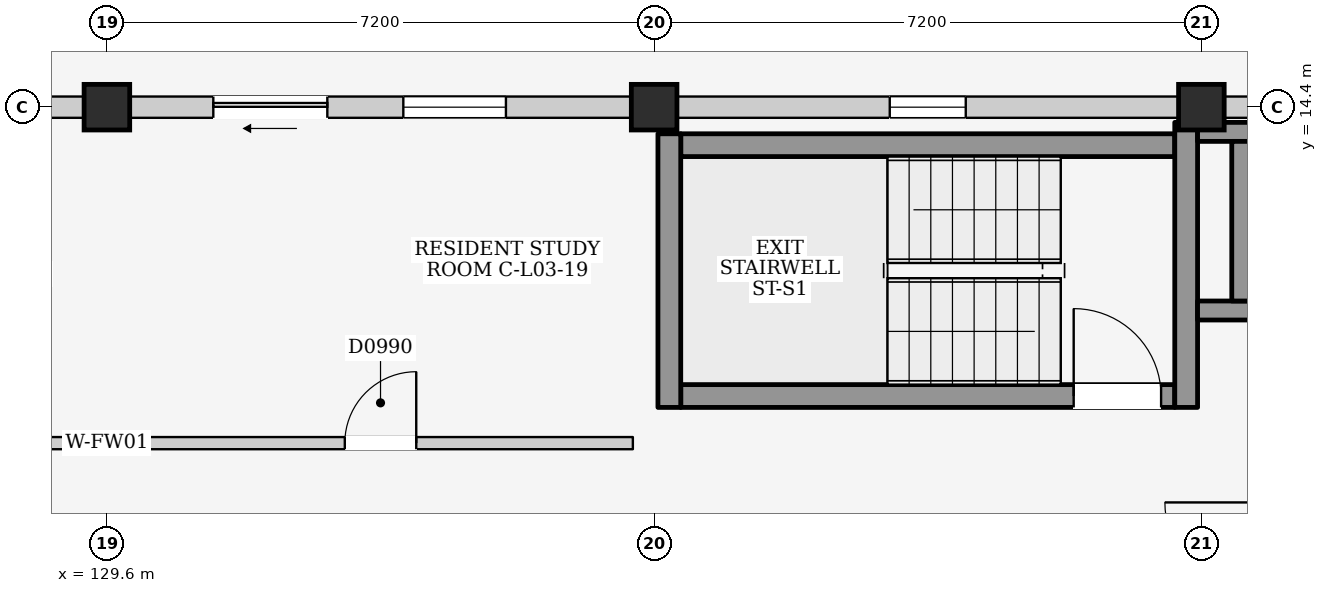
"""IFC4 building model, lengths in metres.
Left out: names, types, materials, properties, quantities, classifications, styles, units other than length and angle.
Written with IfcOpenShell. Run it as: python <this file> out.ifc"""

import sys

from ifc_helpers import new_model, si_unit, direction, frame, frame_2d, origin, origin_2d, place, context, subcontext, project, spatial, rectangle, extrude, element, fill, save


model = new_model("IFC4")
c1 = context("Model", 3, precision=1e-05, world=origin(), true_north=direction((0.0, 1.0)))
c2 = subcontext(c1, "Body", "Model", "MODEL_VIEW")
j1 = project(units=[si_unit("LENGTHUNIT", "METRE"), si_unit("PLANEANGLEUNIT", "RADIAN")], contexts=[c1])
p1 = place(None, origin())
s1 = spatial("IfcSite", under=j1, at=p1, CompositionType="ELEMENT")
p2 = place(p1, origin())
s2 = spatial("IfcBuilding", under=s1, at=p2, CompositionType="ELEMENT")
p3 = place(p2, frame((0.0, 0.0, 12.2)))
s3 = spatial("IfcBuildingStorey", under=s2, at=p3, CompositionType="ELEMENT", Elevation=12.2)
for number, where, z_axis, x_axis in (
    (1, (129.6, 14.4, 0.0), (0.0, 0.0, 1.0), (1.0, 0.0, 0.0)),
    (2, (136.8, 14.4, 0.0), (0.0, 0.0, 1.0), (1.0, 0.0, 0.0)),
    (3, (144.0, 14.4, 0.0), (0.0, 0.0, 1.0), (1.0, 0.0, 0.0)),
):
    element("IfcColumn", number, at=place(p3, frame(where, z_axis=z_axis, x_axis=x_axis)), inside=s3, PredefinedType="COLUMN", context=c2, shape_type="SweptSolid", body=[
        extrude(rectangle(XDim=0.6, YDim=0.6, at=origin_2d()), origin(), (0.0, 0.0, 1.0), 3.2),
    ])
p4 = place(p3, frame((122.7, 14.4, 0.0), z_axis=(0.0, 0.0, 1.0), x_axis=(1.0, 0.0, 0.0)))
e4 = element("IfcWall", 4, at=p4, inside=s3, PredefinedType="ELEMENTEDWALL", context=c2, shape_type="SweptSolid", body=[
    extrude(rectangle(XDim=6.6, YDim=0.28, at=frame_2d((3.3, 0.0))), origin(), (0.0, 0.0, 1.0), 2.365),
])
p5 = place(p4, frame((1.1, 0.0, 0.0)))
e5 = element("IfcOpeningElement", 5, at=p5, cuts=e4, PredefinedType="OPENING", context=c2, shape_type="SweptSolid", body=[
    extrude(rectangle(XDim=1.5, YDim=2.12, at=frame_2d((0.75, 1.06))), frame((0.0, 0.155, 0.0), z_axis=(0.0, -1.0, 0.0), x_axis=(1.0, 0.0, 0.0)), (0.0, 0.0, 1.0), 0.31),
])
p6 = place(p4, frame((3.6, 0.0, 0.755)))
e6 = element("IfcOpeningElement", 6, at=p6, cuts=e4, PredefinedType="OPENING", context=c2, shape_type="SweptSolid", body=[
    extrude(rectangle(XDim=1.35, YDim=1.5, at=frame_2d((0.675, 0.75))), frame((0.0, 0.155, 0.0), z_axis=(0.0, -1.0, 0.0), x_axis=(1.0, 0.0, 0.0)), (0.0, 0.0, 1.0), 0.31),
])
p7 = place(p3, frame((129.9, 14.4, 0.0), z_axis=(0.0, 0.0, 1.0), x_axis=(1.0, 0.0, 0.0)))
e7 = element("IfcWall", 7, at=p7, inside=s3, PredefinedType="ELEMENTEDWALL", context=c2, shape_type="SweptSolid", body=[
    extrude(rectangle(XDim=6.6, YDim=0.28, at=frame_2d((3.3, 0.0))), origin(), (0.0, 0.0, 1.0), 2.365),
])
p8 = place(p7, frame((1.1, 0.0, 0.0)))
e8 = element("IfcOpeningElement", 8, at=p8, cuts=e7, PredefinedType="OPENING", context=c2, shape_type="SweptSolid", body=[
    extrude(rectangle(XDim=1.5, YDim=2.12, at=frame_2d((0.75, 1.06))), frame((0.0, 0.155, 0.0), z_axis=(0.0, -1.0, 0.0), x_axis=(1.0, 0.0, 0.0)), (0.0, 0.0, 1.0), 0.31),
])
p9 = place(p7, frame((3.6, 0.0, 0.755)))
e9 = element("IfcOpeningElement", 9, at=p9, cuts=e7, PredefinedType="OPENING", context=c2, shape_type="SweptSolid", body=[
    extrude(rectangle(XDim=1.35, YDim=1.5, at=frame_2d((0.675, 0.75))), frame((0.0, 0.155, 0.0), z_axis=(0.0, -1.0, 0.0), x_axis=(1.0, 0.0, 0.0)), (0.0, 0.0, 1.0), 0.31),
])
p10 = place(p3, frame((137.1, 14.4, 0.0), z_axis=(0.0, 0.0, 1.0), x_axis=(1.0, 0.0, 0.0)))
e10 = element("IfcWall", 10, at=p10, inside=s3, PredefinedType="ELEMENTEDWALL", context=c2, shape_type="SweptSolid", body=[
    extrude(rectangle(XDim=6.6, YDim=0.28, at=frame_2d((3.3, 0.0))), origin(), (0.0, 0.0, 1.0), 2.365),
])
p11 = place(p10, frame((2.8, 0.0, 1.2)))
e11 = element("IfcOpeningElement", 11, at=p11, cuts=e10, PredefinedType="OPENING", context=c2, shape_type="SweptSolid", body=[
    extrude(rectangle(XDim=1.0, YDim=0.9, at=frame_2d((0.5, 0.45))), frame((0.0, 0.155, 0.0), z_axis=(0.0, -1.0, 0.0), x_axis=(1.0, 0.0, 0.0)), (0.0, 0.0, 1.0), 0.31),
])
p12 = place(p3, frame((144.3, 14.4, 0.0), z_axis=(0.0, 0.0, 1.0), x_axis=(1.0, 0.0, 0.0)))
e12 = element("IfcWall", 12, at=p12, inside=s3, PredefinedType="ELEMENTEDWALL", context=c2, shape_type="SweptSolid", body=[
    extrude(rectangle(XDim=6.6, YDim=0.28, at=frame_2d((3.3, 0.0))), origin(), (0.0, 0.0, 1.0), 2.365),
])
p13 = place(p12, frame((2.8, 0.0, 1.2)))
e13 = element("IfcOpeningElement", 13, at=p13, cuts=e12, PredefinedType="OPENING", context=c2, shape_type="SweptSolid", body=[
    extrude(rectangle(XDim=1.0, YDim=0.9, at=frame_2d((0.5, 0.45))), frame((0.0, 0.155, 0.0), z_axis=(0.0, -1.0, 0.0), x_axis=(1.0, 0.0, 0.0)), (0.0, 0.0, 1.0), 0.31),
])
p14 = place(p3, frame((137.15, 10.6, 0.0), z_axis=(0.0, 0.0, 1.0), x_axis=(1.0, 0.0, 0.0)))
e14 = element("IfcWall", 14, at=p14, inside=s3, PredefinedType="SHEAR", context=c2, shape_type="SweptSolid", body=[
    extrude(rectangle(XDim=6.5, YDim=0.3, at=frame_2d((3.25, 0.0))), origin(), (0.0, 0.0, 1.0), 2.98),
])
p15 = place(p14, frame((5.17, 0.0, 0.0)))
e15 = element("IfcOpeningElement", 15, at=p15, cuts=e14, PredefinedType="OPENING", context=c2, shape_type="SweptSolid", body=[
    extrude(rectangle(XDim=1.15, YDim=2.2, at=frame_2d((0.575, 1.1))), frame((0.0, 0.165, 0.0), z_axis=(0.0, -1.0, 0.0), x_axis=(1.0, 0.0, 0.0)), (0.0, 0.0, 1.0), 0.33),
])
p16 = place(p3, frame((137.15, 13.9, 0.0), z_axis=(0.0, 0.0, 1.0), x_axis=(1.0, 0.0, 0.0)))
e16 = element("IfcWall", 16, at=p16, inside=s3, PredefinedType="SHEAR", context=c2, shape_type="SweptSolid", body=[
    extrude(rectangle(XDim=6.5, YDim=0.3, at=frame_2d((3.25, 0.0))), origin(), (0.0, 0.0, 1.0), 2.98),
])
p17 = place(p3, frame((137.0, 10.45, 0.0), z_axis=(0.0, 0.0, 1.0), x_axis=(0.0, 1.0, 0.0)))
e17 = element("IfcWall", 17, at=p17, inside=s3, PredefinedType="SHEAR", context=c2, shape_type="SweptSolid", body=[
    extrude(rectangle(XDim=3.6, YDim=0.3, at=frame_2d((1.8, 0.0))), origin(), (0.0, 0.0, 1.0), 2.98),
])
p18 = place(p3, frame((143.8, 10.45, 0.0), z_axis=(0.0, 0.0, 1.0), x_axis=(0.0, 1.0, 0.0)))
e18 = element("IfcWall", 18, at=p18, inside=s3, PredefinedType="SHEAR", context=c2, shape_type="SweptSolid", body=[
    extrude(rectangle(XDim=3.75, YDim=0.3, at=frame_2d((1.875, 0.0))), origin(), (0.0, 0.0, 1.0), 2.98),
])
p19 = place(p3, frame((143.95, 11.725, 0.0), z_axis=(0.0, 0.0, 1.0), x_axis=(1.0, 0.0, 0.0)))
e19 = element("IfcWall", 19, at=p19, inside=s3, PredefinedType="SHEAR", context=c2, shape_type="SweptSolid", body=[
    extrude(rectangle(XDim=2.55, YDim=0.25, at=frame_2d((1.275, 0.0))), origin(), (0.0, 0.0, 1.0), 2.98),
])
p20 = place(p19, frame((0.95, 0.0, 0.0)))
e20 = element("IfcOpeningElement", 20, at=p20, cuts=e19, PredefinedType="OPENING", context=c2, shape_type="SweptSolid", body=[
    extrude(rectangle(XDim=1.1, YDim=2.15, at=frame_2d((0.55, 1.075))), frame((0.0, 0.14, 0.0), z_axis=(0.0, -1.0, 0.0), x_axis=(1.0, 0.0, 0.0)), (0.0, 0.0, 1.0), 0.28),
])
p21 = place(p3, frame((143.95, 14.075, 0.0), z_axis=(0.0, 0.0, 1.0), x_axis=(1.0, 0.0, 0.0)))
e21 = element("IfcWall", 21, at=p21, inside=s3, PredefinedType="SHEAR", context=c2, shape_type="SweptSolid", body=[
    extrude(rectangle(XDim=2.55, YDim=0.25, at=frame_2d((1.275, 0.0))), origin(), (0.0, 0.0, 1.0), 2.98),
])
p22 = place(p3, frame((144.525, 11.85, 0.0), z_axis=(0.0, 0.0, 1.0), x_axis=(0.0, 1.0, 0.0)))
e22 = element("IfcWall", 22, at=p22, inside=s3, PredefinedType="SHEAR", context=c2, shape_type="SweptSolid", body=[
    extrude(rectangle(XDim=2.1, YDim=0.25, at=frame_2d((1.05, 0.0))), origin(), (0.0, 0.0, 1.0), 2.98),
])
p23 = place(p3, frame((122.68, 9.98, 0.0), z_axis=(0.0, 0.0, 1.0), x_axis=(1.0, 0.0, 0.0)))
e23 = element("IfcWall", 23, at=p23, inside=s3, PredefinedType="PARTITIONING", context=c2, shape_type="SweptSolid", body=[
    extrude(rectangle(XDim=6.64, YDim=0.16, at=frame_2d((3.32, 0.0))), origin(), (0.0, 0.0, 1.0), 2.98),
])
p24 = place(p23, frame((2.85, 0.0, 0.0)))
e24 = element("IfcOpeningElement", 24, at=p24, cuts=e23, PredefinedType="OPENING", context=c2, shape_type="SweptSolid", body=[
    extrude(rectangle(XDim=0.94, YDim=2.12, at=frame_2d((0.47, 1.06))), frame((0.0, 0.095, 0.0), z_axis=(0.0, -1.0, 0.0), x_axis=(1.0, 0.0, 0.0)), (0.0, 0.0, 1.0), 0.19),
])
p25 = place(p3, frame((129.88, 9.98, 0.0), z_axis=(0.0, 0.0, 1.0), x_axis=(1.0, 0.0, 0.0)))
e25 = element("IfcWall", 25, at=p25, inside=s3, PredefinedType="PARTITIONING", context=c2, shape_type="SweptSolid", body=[
    extrude(rectangle(XDim=6.64, YDim=0.16, at=frame_2d((3.32, 0.0))), origin(), (0.0, 0.0, 1.0), 2.98),
])
p26 = place(p25, frame((2.85, 0.0, 0.0)))
e26 = element("IfcOpeningElement", 26, at=p26, cuts=e25, PredefinedType="OPENING", context=c2, shape_type="SweptSolid", body=[
    extrude(rectangle(XDim=0.94, YDim=2.12, at=frame_2d((0.47, 1.06))), frame((0.0, 0.095, 0.0), z_axis=(0.0, -1.0, 0.0), x_axis=(1.0, 0.0, 0.0)), (0.0, 0.0, 1.0), 0.19),
])
p27 = place(p8, frame((1.5, 0.0, 0.0), z_axis=(0.0, 0.0, 1.0), x_axis=(-1.0, 0.0, 0.0)))
e27 = element("IfcDoor", 27, at=p27, inside=s3, OperationType="SLIDING_TO_LEFT", PredefinedType="DOOR", context=c2, shape_type="SweptSolid", body=[
    extrude(rectangle(XDim=1.5, YDim=2.12, at=frame_2d((0.75, 1.06))), frame((0.0, 0.025, 0.0), z_axis=(0.0, -1.0, 0.0), x_axis=(1.0, 0.0, 0.0)), (0.0, 0.0, 1.0), 0.05),
])
fill(e8, e27)
p28 = place(p9, origin())
e28 = element("IfcWindow", 28, at=p28, inside=s3, PartitioningType="SINGLE_PANEL", PredefinedType="WINDOW", context=c2, shape_type="SweptSolid", body=[
    extrude(rectangle(XDim=1.35, YDim=1.5, at=frame_2d((0.675, 0.75))), frame((0.0, 0.03, 0.0), z_axis=(0.0, -1.0, 0.0), x_axis=(1.0, 0.0, 0.0)), (0.0, 0.0, 1.0), 0.06),
])
fill(e9, e28)
p29 = place(p11, origin())
e29 = element("IfcWindow", 29, at=p29, inside=s3, PartitioningType="SINGLE_PANEL", PredefinedType="WINDOW", context=c2, shape_type="SweptSolid", body=[
    extrude(rectangle(XDim=1.0, YDim=0.9, at=frame_2d((0.5, 0.45))), frame((0.0, 0.03, 0.0), z_axis=(0.0, -1.0, 0.0), x_axis=(1.0, 0.0, 0.0)), (0.0, 0.0, 1.0), 0.06),
])
fill(e11, e29)
p30 = place(p15, origin())
e30 = element("IfcDoor", 30, at=p30, inside=s3, OperationType="SINGLE_SWING_LEFT", PredefinedType="DOOR", context=c2, shape_type="SweptSolid", body=[
    extrude(rectangle(XDim=1.15, YDim=2.2, at=frame_2d((0.575, 1.1))), frame((0.0, 0.025, 0.0), z_axis=(0.0, -1.0, 0.0), x_axis=(1.0, 0.0, 0.0)), (0.0, 0.0, 1.0), 0.05),
])
fill(e15, e30)
p31 = place(p26, origin())
e31 = element("IfcDoor", 31, at=p31, inside=s3, OperationType="SINGLE_SWING_RIGHT", PredefinedType="DOOR", context=c2, shape_type="SweptSolid", body=[
    extrude(rectangle(XDim=0.94, YDim=2.12, at=frame_2d((0.47, 1.06))), frame((0.0, 0.025, 0.0), z_axis=(0.0, -1.0, 0.0), x_axis=(1.0, 0.0, 0.0)), (0.0, 0.0, 1.0), 0.05),
])
fill(e26, e31)
save(model, sys.argv[1])
